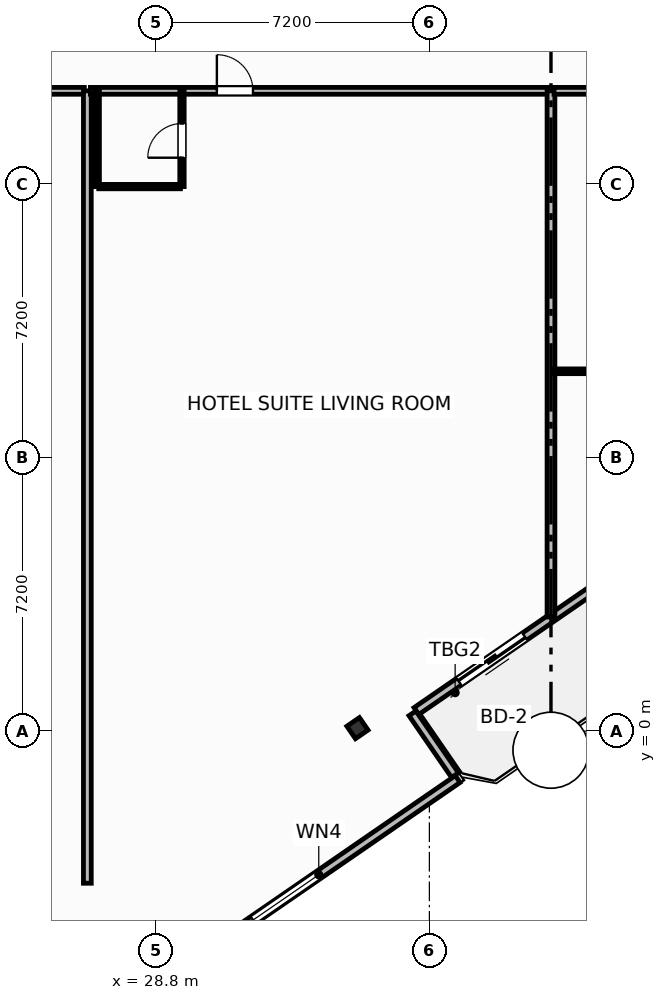
"""IFC4 building model, lengths in metres.
Left out: names, types, materials, properties, quantities, classifications, styles, units other than length and angle.
Written with IfcOpenShell. Run it as: python <this file> out.ifc"""

import sys

from ifc_helpers import new_model, si_unit, direction, frame, frame_2d, origin, origin_2d, place, context, subcontext, project, spatial, rectangle, i_section, extrude, element, fill, save


model = new_model("IFC4")
c1 = context("Model", 3, precision=1e-05, world=origin(), true_north=direction((0.0, 1.0)))
c2 = subcontext(c1, "Body", "Model", "MODEL_VIEW")
j1 = project(units=[si_unit("LENGTHUNIT", "METRE"), si_unit("PLANEANGLEUNIT", "RADIAN")], contexts=[c1])
p1 = place(None, origin())
s1 = spatial("IfcSite", under=j1, at=p1, CompositionType="ELEMENT")
p2 = place(p1, origin())
s2 = spatial("IfcBuilding", under=s1, at=p2, CompositionType="ELEMENT")
p3 = place(p2, frame((0.0, 0.0, 269.3)))
s3 = spatial("IfcBuildingStorey", under=s2, at=p3, CompositionType="ELEMENT", Elevation=269.3)
p4 = place(p3, frame((34.107, 0.081, 0.0), z_axis=(0.0, 0.0, 1.0), x_axis=(0.823532597628, 0.567268949127, 0.0)))
e1 = element("IfcColumn", 1, at=p4, inside=s3, PredefinedType="COLUMN", context=c2, shape_type="SweptSolid", body=[
    extrude(i_section(OverallWidth=0.401, OverallDepth=0.399, WebThickness=0.025, FlangeThickness=0.04, FilletRadius=0.022, at=origin_2d()), origin(), (0.0, 0.0, 1.0), 3.7),
])
p5 = place(p3, frame((40.244, 3.688, 0.0), z_axis=(0.0, 0.0, 1.0), x_axis=(-0.823541290762, -0.567256328665, 0.0)))
e2 = element("IfcWall", 2, at=p5, inside=s3, PredefinedType="SOLIDWALL", context=c2, shape_type="SweptSolid", body=[
    extrude(rectangle(XDim=5.567, YDim=0.22, at=frame_2d((2.784, 0.0))), origin(), (0.0, 0.0, 1.0), 2.73),
])
p6 = place(p5, frame((2.107, 0.0, 0.0)))
e3 = element("IfcOpeningElement", 3, at=p6, cuts=e2, PredefinedType="OPENING", context=c2, shape_type="SweptSolid", body=[
    extrude(rectangle(XDim=2.1, YDim=2.3, at=frame_2d((1.05, 1.15))), frame((0.0, 0.12, 0.0), z_axis=(0.0, -1.0, 0.0), x_axis=(1.0, 0.0, 0.0)), (0.0, 0.0, 1.0), 0.24),
])
p7 = place(p3, frame((27.704, -7.488, 0.0), z_axis=(0.0, 0.0, 1.0), x_axis=(0.823529068157, 0.567274073003, 0.0)))
e4 = element("IfcWall", 4, at=p7, inside=s3, PredefinedType="SOLIDWALL", context=c2, shape_type="SweptSolid", body=[
    extrude(rectangle(XDim=10.98, YDim=0.22, at=frame_2d((5.49, 0.0))), origin(), (0.0, 0.0, 1.0), 2.73),
])
p8 = place(p7, frame((4.44, 0.0, 0.8)))
e5 = element("IfcOpeningElement", 5, at=p8, cuts=e4, PredefinedType="OPENING", context=c2, shape_type="SweptSolid", body=[
    extrude(rectangle(XDim=2.1, YDim=1.75, at=frame_2d((1.05, 0.875))), frame((0.0, 0.12, 0.0), z_axis=(0.0, -1.0, 0.0), x_axis=(1.0, 0.0, 0.0)), (0.0, 0.0, 1.0), 0.24),
])
p9 = place(p3, frame((36.675, -1.156, 0.0), z_axis=(0.0, 0.0, 1.0), x_axis=(-0.567215821234, 0.823569190865, 0.0)))
e6 = element("IfcWall", 6, at=p9, inside=s3, PredefinedType="SOLIDWALL", context=c2, shape_type="SweptSolid", body=[
    extrude(rectangle(XDim=1.975, YDim=0.22, at=frame_2d((0.988, 0.0))), origin(), (0.0, 0.0, 1.0), 2.73),
])
p10 = place(p3, frame((5.038, 16.85, 0.0), z_axis=(0.0, 0.0, 1.0), x_axis=(1.0, 0.0, 0.0)))
e7 = element("IfcWall", 7, at=p10, inside=s3, PredefinedType="PARTITIONING", context=c2, shape_type="SweptSolid", body=[
    extrude(rectangle(XDim=21.882, YDim=0.18, at=frame_2d((10.941, 0.0))), origin(), (0.0, 0.0, 1.0), 2.739),
])
p11 = place(p10, frame((16.725, 0.0, 0.0)))
e8 = element("IfcOpeningElement", 8, at=p11, cuts=e7, PredefinedType="OPENING", context=c2, shape_type="SweptSolid", body=[
    extrude(rectangle(XDim=0.95, YDim=2.15, at=frame_2d((0.475, 1.075))), frame((0.0, 0.1, 0.0), z_axis=(0.0, -1.0, 0.0), x_axis=(1.0, 0.0, 0.0)), (0.0, 0.0, 1.0), 0.2),
])
p12 = place(p3, frame((27.0, -4.0, 0.0), z_axis=(0.0, 0.0, 1.0), x_axis=(0.0, 1.0, 0.0)))
e9 = element("IfcWall", 9, at=p12, inside=s3, PredefinedType="PARTITIONING", context=c2, shape_type="SweptSolid", body=[
    extrude(rectangle(XDim=20.85, YDim=0.205, at=frame_2d((10.425, 0.0))), origin(), (0.0, 0.0, 1.0), 3.45),
])
p13 = place(p3, frame((27.08, 16.85, 0.0), z_axis=(0.0, 0.0, 1.0), x_axis=(1.0, 0.0, 0.0)))
e10 = element("IfcWall", 10, at=p13, inside=s3, PredefinedType="PARTITIONING", context=c2, shape_type="SweptSolid", body=[
    extrude(rectangle(XDim=12.04, YDim=0.18, at=frame_2d((6.02, 0.0))), origin(), (0.0, 0.0, 1.0), 3.45),
])
p14 = place(p13, frame((3.328, 0.0, 0.0)))
e11 = element("IfcOpeningElement", 11, at=p14, cuts=e10, PredefinedType="OPENING", context=c2, shape_type="SweptSolid", body=[
    extrude(rectangle(XDim=0.95, YDim=2.15, at=frame_2d((0.475, 1.075))), frame((0.0, 0.1, 0.0), z_axis=(0.0, -1.0, 0.0), x_axis=(1.0, 0.0, 0.0)), (0.0, 0.0, 1.0), 0.2),
])
p15 = place(p3, frame((27.3, 14.33, 0.0), z_axis=(0.0, 0.0, 1.0), x_axis=(1.0, 0.0, 0.0)))
e12 = element("IfcWall", 12, at=p15, inside=s3, PredefinedType="PARTITIONING", context=c2, shape_type="SweptSolid", body=[
    extrude(rectangle(XDim=2.15, YDim=0.115, at=frame_2d((1.075, 0.0))), origin(), (0.0, 0.0, 1.0), 3.45),
])
p16 = place(p3, frame((29.49, 14.33, 0.0), z_axis=(0.0, 0.0, 1.0), x_axis=(0.0, 1.0, 0.0)))
e13 = element("IfcWall", 13, at=p16, inside=s3, PredefinedType="PARTITIONING", context=c2, shape_type="SweptSolid", body=[
    extrude(rectangle(XDim=2.52, YDim=0.115, at=frame_2d((1.26, 0.0))), origin(), (0.0, 0.0, 1.0), 3.45),
])
p17 = place(p16, frame((0.76, 0.0, 0.0)))
e14 = element("IfcOpeningElement", 14, at=p17, cuts=e13, PredefinedType="OPENING", context=c2, shape_type="SweptSolid", body=[
    extrude(rectangle(XDim=0.9, YDim=2.05, at=frame_2d((0.45, 1.025))), frame((0.0, 0.067, 0.0), z_axis=(0.0, -1.0, 0.0), x_axis=(1.0, 0.0, 0.0)), (0.0, 0.0, 1.0), 0.135),
])
p18 = place(p3, frame((27.26, 14.33, 0.0), z_axis=(0.0, 0.0, 1.0), x_axis=(0.0, 1.0, 0.0)))
e15 = element("IfcWall", 15, at=p18, inside=s3, PredefinedType="PARTITIONING", context=c2, shape_type="SweptSolid", body=[
    extrude(rectangle(XDim=2.52, YDim=0.115, at=frame_2d((1.26, 0.0))), origin(), (0.0, 0.0, 1.0), 3.45),
])
p19 = place(p3, frame((39.2, 3.006, 0.0), z_axis=(0.0, 0.0, 1.0), x_axis=(0.0, 1.0, 0.0)))
e16 = element("IfcWall", 16, at=p19, inside=s3, PredefinedType="PARTITIONING", context=c2, shape_type="SweptSolid", body=[
    extrude(rectangle(XDim=13.844, YDim=0.205, at=frame_2d((6.922, 0.0))), origin(), (0.0, 0.0, 1.0), 3.45),
])
p20 = place(p3, frame((39.28, 9.47, 0.0), z_axis=(0.0, 0.0, 1.0), x_axis=(1.0, 0.0, 0.0)))
e17 = element("IfcWall", 17, at=p20, inside=s3, PredefinedType="PARTITIONING", context=c2, shape_type="SweptSolid", body=[
    extrude(rectangle(XDim=7.27, YDim=0.125, at=frame_2d((3.635, 0.0))), origin(), (0.0, 0.0, 1.0), 3.45),
])
p21 = place(p20, frame((3.271, 0.0, 0.0)))
e18 = element("IfcOpeningElement", 18, at=p21, cuts=e17, PredefinedType="OPENING", context=c2, shape_type="SweptSolid", body=[
    extrude(rectangle(XDim=0.92, YDim=2.05, at=frame_2d((0.46, 1.025))), frame((0.0, 0.073, 0.0), z_axis=(0.0, -1.0, 0.0), x_axis=(1.0, 0.0, 0.0)), (0.0, 0.0, 1.0), 0.145),
])
p22 = place(p3, frame((39.28, 16.85, 0.0), z_axis=(0.0, 0.0, 1.0), x_axis=(1.0, 0.0, 0.0)))
e19 = element("IfcWall", 19, at=p22, inside=s3, PredefinedType="PARTITIONING", context=c2, shape_type="SweptSolid", body=[
    extrude(rectangle(XDim=12.14, YDim=0.18, at=frame_2d((6.07, 0.0))), origin(), (0.0, 0.0, 1.0), 3.45),
])
p23 = place(p22, frame((3.135, 0.0, 0.0)))
e20 = element("IfcOpeningElement", 20, at=p23, cuts=e19, PredefinedType="OPENING", context=c2, shape_type="SweptSolid", body=[
    extrude(rectangle(XDim=1.0, YDim=2.2, at=frame_2d((0.5, 1.1))), frame((0.0, 0.1, 0.0), z_axis=(0.0, -1.0, 0.0), x_axis=(1.0, 0.0, 0.0)), (0.0, 0.0, 1.0), 0.2),
])
p24 = place(p6, origin())
e21 = element("IfcDoor", 21, at=p24, inside=s3, OperationType="SLIDING_TO_LEFT", PredefinedType="DOOR", context=c2, shape_type="SweptSolid", body=[
    extrude(rectangle(XDim=2.1, YDim=2.3, at=frame_2d((1.05, 1.15))), frame((0.0, 0.025, 0.0), z_axis=(0.0, -1.0, 0.0), x_axis=(1.0, 0.0, 0.0)), (0.0, 0.0, 1.0), 0.05),
])
fill(e3, e21)
p25 = place(p8, origin())
e22 = element("IfcWindow", 22, at=p25, inside=s3, PartitioningType="SINGLE_PANEL", PredefinedType="WINDOW", context=c2, shape_type="SweptSolid", body=[
    extrude(rectangle(XDim=2.1, YDim=1.75, at=frame_2d((1.05, 0.875))), frame((0.0, 0.03, 0.0), z_axis=(0.0, -1.0, 0.0), x_axis=(1.0, 0.0, 0.0)), (0.0, 0.0, 1.0), 0.06),
])
fill(e5, e22)
p26 = place(p14, origin())
e23 = element("IfcDoor", 23, at=p26, inside=s3, OperationType="SINGLE_SWING_LEFT", PredefinedType="DOOR", context=c2, shape_type="SweptSolid", body=[
    extrude(rectangle(XDim=0.95, YDim=2.15, at=frame_2d((0.475, 1.075))), frame((0.0, 0.025, 0.0), z_axis=(0.0, -1.0, 0.0), x_axis=(1.0, 0.0, 0.0)), (0.0, 0.0, 1.0), 0.05),
])
fill(e11, e23)
p27 = place(p17, origin())
e24 = element("IfcDoor", 24, at=p27, inside=s3, OperationType="SINGLE_SWING_LEFT", PredefinedType="DOOR", context=c2, shape_type="SweptSolid", body=[
    extrude(rectangle(XDim=0.9, YDim=2.05, at=frame_2d((0.45, 1.025))), frame((0.0, 0.025, 0.0), z_axis=(0.0, -1.0, 0.0), x_axis=(1.0, 0.0, 0.0)), (0.0, 0.0, 1.0), 0.05),
])
fill(e14, e24)
save(model, sys.argv[1])
